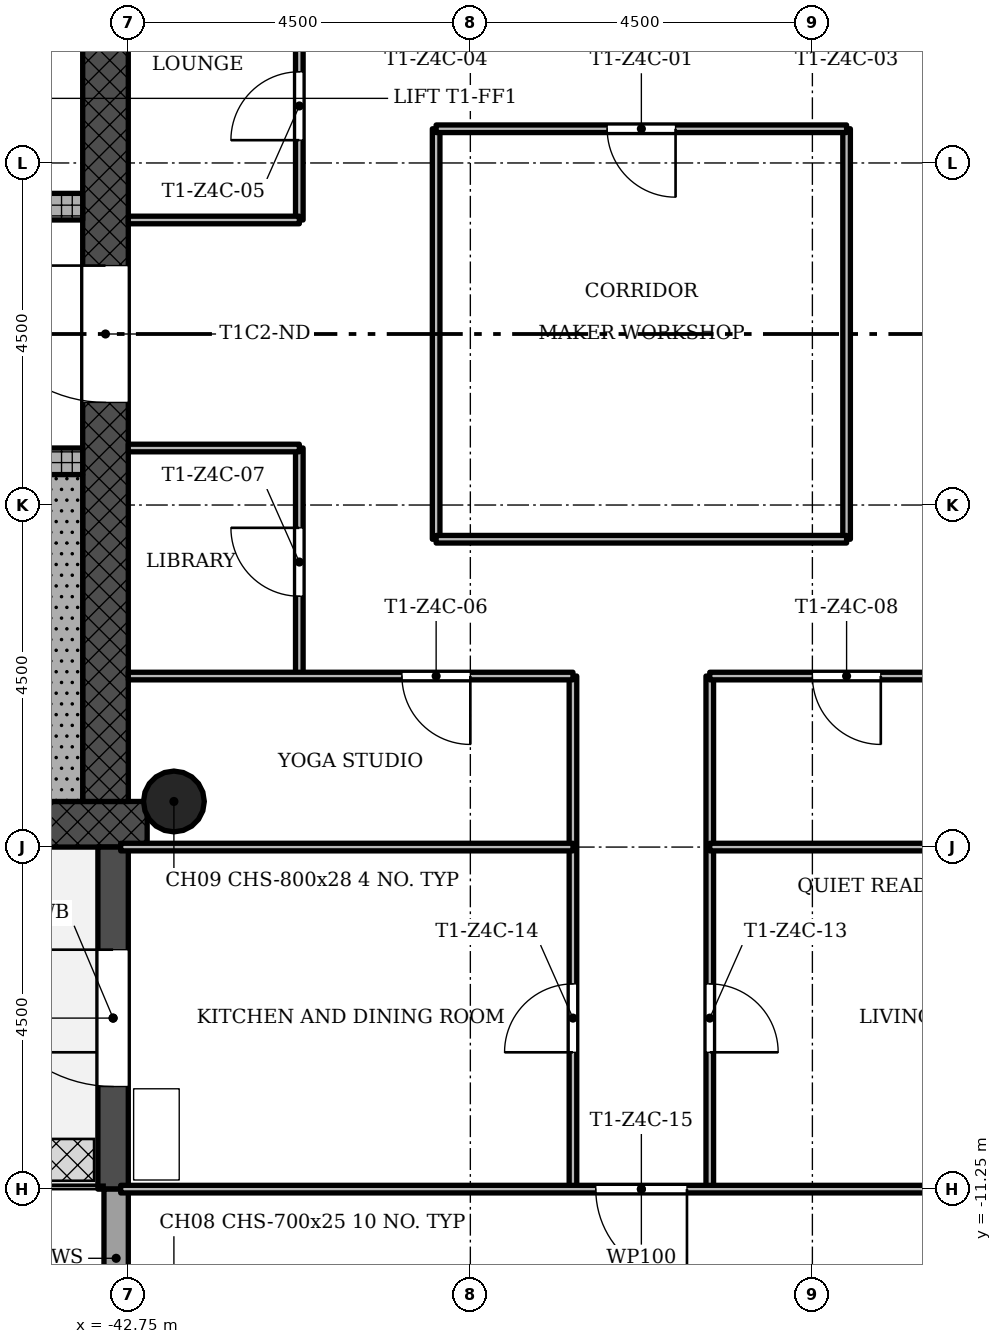
"""IFC4 building model, lengths in metres.
Left out: names, types, materials, properties, quantities, classifications, styles, units other than length and angle.
Written with IfcOpenShell. Run it as: python <this file> out.ifc"""

import sys

from ifc_helpers import new_model, si_unit, direction, frame, frame_2d, origin, origin_2d, place, context, subcontext, project, spatial, rectangle, hollow_circle, extrude, element, fill, save


model = new_model("IFC4")
c1 = context("Model", 3, precision=1e-05, world=origin(), true_north=direction((0.0, 1.0)))
c2 = subcontext(c1, "Body", "Model", "MODEL_VIEW")
j1 = project(units=[si_unit("LENGTHUNIT", "METRE"), si_unit("PLANEANGLEUNIT", "RADIAN")], contexts=[c1])
p1 = place(None, origin())
s1 = spatial("IfcSite", under=j1, at=p1, CompositionType="ELEMENT")
p2 = place(p1, origin())
s2 = spatial("IfcBuilding", under=s1, at=p2, CompositionType="ELEMENT")
p3 = place(p2, frame((0.0, 0.0, 192.6)))
s3 = spatial("IfcBuildingStorey", under=s2, at=p3, CompositionType="ELEMENT", Elevation=192.6)
p4 = place(p3, frame((-51.15, -6.45, 0.0), z_axis=(0.0, 0.0, 1.0), x_axis=(1.0, 0.0, 0.0)))
e1 = element("IfcWall", 1, at=p4, inside=s3, PredefinedType="SHEAR", context=c2, shape_type="SweptSolid", body=[
    extrude(rectangle(XDim=8.648, YDim=0.6, at=frame_2d((4.324, 0.0))), origin(), (0.0, 0.0, 1.0), 3.4),
])
p5 = place(p3, frame((-43.05, -6.15, 0.0), z_axis=(0.0, 0.0, 1.0), x_axis=(0.0, 1.0, 0.0)))
e2 = element("IfcWall", 2, at=p5, inside=s3, PredefinedType="SHEAR", context=c2, shape_type="SweptSolid", body=[
    extrude(rectangle(XDim=12.9, YDim=0.6, at=frame_2d((6.45, 0.0))), origin(), (0.0, 0.0, 1.0), 3.4),
])
p6 = place(p5, frame((5.25, 0.0, 0.0)))
e3 = element("IfcOpeningElement", 3, at=p6, cuts=e2, PredefinedType="OPENING", context=c2, shape_type="SweptSolid", body=[
    extrude(rectangle(XDim=1.8, YDim=2.1, at=frame_2d((0.9, 1.05))), frame((0.0, 0.31, 0.0), z_axis=(0.0, -1.0, 0.0), x_axis=(1.0, 0.0, 0.0)), (0.0, 0.0, 1.0), 0.62),
])
p7 = place(p3, frame((-51.15, -1.675, 0.0), z_axis=(0.0, 0.0, 1.0), x_axis=(1.0, 0.0, 0.0)))
e4 = element("IfcWall", 4, at=p7, inside=s3, PredefinedType="SHEAR", context=c2, shape_type="SweptSolid", body=[
    extrude(rectangle(XDim=7.8, YDim=0.35, at=frame_2d((3.9, 0.0))), origin(), (0.0, 0.0, 1.0), 3.4),
])
p8 = place(p7, frame((5.85, 0.0, 0.0)))
e5 = element("IfcOpeningElement", 5, at=p8, cuts=e4, PredefinedType="OPENING", context=c2, shape_type="SweptSolid", body=[
    extrude(rectangle(XDim=0.9, YDim=2.1, at=frame_2d((0.45, 1.05))), frame((0.0, 0.185, 0.0), z_axis=(0.0, -1.0, 0.0), x_axis=(1.0, 0.0, 0.0)), (0.0, 0.0, 1.0), 0.37),
])
p9 = place(p3, frame((-51.15, 1.675, 0.0), z_axis=(0.0, 0.0, 1.0), x_axis=(1.0, 0.0, 0.0)))
e6 = element("IfcWall", 6, at=p9, inside=s3, PredefinedType="SHEAR", context=c2, shape_type="SweptSolid", body=[
    extrude(rectangle(XDim=7.8, YDim=0.35, at=frame_2d((3.9, 0.0))), origin(), (0.0, 0.0, 1.0), 3.4),
])
p10 = place(p9, frame((5.55, 0.0, 0.0)))
e7 = element("IfcOpeningElement", 7, at=p10, cuts=e6, PredefinedType="OPENING", context=c2, shape_type="SweptSolid", body=[
    extrude(rectangle(XDim=1.1, YDim=2.1, at=frame_2d((0.55, 1.05))), frame((0.0, 0.185, 0.0), z_axis=(0.0, -1.0, 0.0), x_axis=(1.0, 0.0, 0.0)), (0.0, 0.0, 1.0), 0.37),
])
p11 = place(p9, frame((1.2, 0.0, 0.0)))
e8 = element("IfcOpeningElement", 8, at=p11, cuts=e6, PredefinedType="OPENING", context=c2, shape_type="SweptSolid", body=[
    extrude(rectangle(XDim=1.1, YDim=2.1, at=frame_2d((0.55, 1.05))), frame((0.0, 0.185, 0.0), z_axis=(0.0, -1.0, 0.0), x_axis=(1.0, 0.0, 0.0)), (0.0, 0.0, 1.0), 0.37),
])
p12 = place(p9, frame((3.5, 0.0, 0.0)))
e9 = element("IfcOpeningElement", 9, at=p12, cuts=e6, PredefinedType="OPENING", context=c2, shape_type="SweptSolid", body=[
    extrude(rectangle(XDim=0.9, YDim=2.1, at=frame_2d((0.45, 1.05))), frame((0.0, 0.185, 0.0), z_axis=(0.0, -1.0, 0.0), x_axis=(1.0, 0.0, 0.0)), (0.0, 0.0, 1.0), 0.37),
])
p13 = place(p3, frame((-42.15, -6.15, 0.0), z_axis=(0.0, 0.0, 1.0), x_axis=(1.0, 0.0, 0.0)))
e10 = element("IfcColumn", 10, at=p13, inside=s3, PredefinedType="COLUMN", context=c2, shape_type="SweptSolid", body=[
    extrude(hollow_circle(Radius=0.4, WallThickness=0.028, at=origin_2d()), origin(), (0.0, 0.0, 1.0), 3.4),
])
p14 = place(p3, frame((-42.95, -6.75, -0.02), z_axis=(0.0, 0.0, 1.0), x_axis=(0.0, -1.0, 0.0)))
e11 = element("IfcWall", 11, at=p14, inside=s3, PredefinedType="STANDARD", context=c2, shape_type="SweptSolid", body=[
    extrude(rectangle(XDim=4.5, YDim=0.4, at=frame_2d((2.25, 0.0))), origin(), (0.0, 0.0, 1.0), 3.12),
])
p15 = place(p14, frame((1.35, 0.0, 0.02)))
e12 = element("IfcOpeningElement", 12, at=p15, cuts=e11, PredefinedType="OPENING", context=c2, shape_type="SweptSolid", body=[
    extrude(rectangle(XDim=1.8, YDim=2.1, at=frame_2d((0.9, 1.05))), frame((0.0, 0.21, 0.0), z_axis=(0.0, -1.0, 0.0), x_axis=(1.0, 0.0, 0.0)), (0.0, 0.0, 1.0), 0.42),
])
p16 = place(p3, frame((-42.91, -11.25, -0.3), z_axis=(0.0, 0.0, 1.0), x_axis=(0.0, -1.0, 0.0)))
e13 = element("IfcWall", 13, at=p16, inside=s3, PredefinedType="STANDARD", context=c2, shape_type="SweptSolid", body=[
    extrude(rectangle(XDim=1.82, YDim=0.32, at=frame_2d((0.91, 0.0))), origin(), (0.0, 0.0, 1.0), 3.4),
])
p17 = place(p3, frame((-40.5, -4.5, 0.0), z_axis=(0.0, 0.0, 1.0), x_axis=(0.0, 1.0, 0.0)))
e14 = element("IfcWall", 14, at=p17, inside=s3, PredefinedType="PARTITIONING", context=c2, shape_type="SweptSolid", body=[
    extrude(rectangle(XDim=3.0, YDim=0.1, at=frame_2d((1.5, 0.0))), origin(), (0.0, 0.0, 1.0), 3.0),
])
p18 = place(p17, frame((1.05, 0.0, 0.0)))
e15 = element("IfcOpeningElement", 15, at=p18, cuts=e14, PredefinedType="OPENING", context=c2, shape_type="SweptSolid", body=[
    extrude(rectangle(XDim=0.9, YDim=2.1, at=frame_2d((0.45, 1.05))), frame((0.0, 0.06, 0.0), z_axis=(0.0, -1.0, 0.0), x_axis=(1.0, 0.0, 0.0)), (0.0, 0.0, 1.0), 0.12),
])
p19 = place(p3, frame((-40.5, 1.5, 0.0), z_axis=(0.0, 0.0, 1.0), x_axis=(0.0, 1.0, 0.0)))
e16 = element("IfcWall", 16, at=p19, inside=s3, PredefinedType="PARTITIONING", context=c2, shape_type="SweptSolid", body=[
    extrude(rectangle(XDim=5.25, YDim=0.1, at=frame_2d((2.625, 0.0))), origin(), (0.0, 0.0, 1.0), 3.0),
])
p20 = place(p19, frame((1.05, 0.0, 0.0)))
e17 = element("IfcOpeningElement", 17, at=p20, cuts=e16, PredefinedType="OPENING", context=c2, shape_type="SweptSolid", body=[
    extrude(rectangle(XDim=0.9, YDim=2.1, at=frame_2d((0.45, 1.05))), frame((0.0, 0.06, 0.0), z_axis=(0.0, -1.0, 0.0), x_axis=(1.0, 0.0, 0.0)), (0.0, 0.0, 1.0), 0.12),
])
p21 = place(p3, frame((-38.7, -2.7, 0.0), z_axis=(0.0, 0.0, 1.0), x_axis=(0.0, 1.0, 0.0)))
e18 = element("IfcWall", 18, at=p21, inside=s3, PredefinedType="PARTITIONING", context=c2, shape_type="SweptSolid", body=[
    extrude(rectangle(XDim=5.4, YDim=0.1, at=frame_2d((2.7, 0.0))), origin(), (0.0, 0.0, 1.0), 3.0),
])
p22 = place(p3, frame((-36.9, -11.25, 0.0), z_axis=(0.0, 0.0, 1.0), x_axis=(0.0, 1.0, 0.0)))
e19 = element("IfcWall", 19, at=p22, inside=s3, PredefinedType="PARTITIONING", context=c2, shape_type="SweptSolid", body=[
    extrude(rectangle(XDim=6.75, YDim=0.1, at=frame_2d((3.375, 0.0))), origin(), (0.0, 0.0, 1.0), 3.0),
])
p23 = place(p22, frame((1.8, 0.0, 0.0)))
e20 = element("IfcOpeningElement", 20, at=p23, cuts=e19, PredefinedType="OPENING", context=c2, shape_type="SweptSolid", body=[
    extrude(rectangle(XDim=0.9, YDim=2.1, at=frame_2d((0.45, 1.05))), frame((0.0, 0.06, 0.0), z_axis=(0.0, -1.0, 0.0), x_axis=(1.0, 0.0, 0.0)), (0.0, 0.0, 1.0), 0.12),
])
p24 = place(p3, frame((-35.1, -11.25, 0.0), z_axis=(0.0, 0.0, 1.0), x_axis=(0.0, 1.0, 0.0)))
e21 = element("IfcWall", 21, at=p24, inside=s3, PredefinedType="PARTITIONING", context=c2, shape_type="SweptSolid", body=[
    extrude(rectangle(XDim=6.75, YDim=0.1, at=frame_2d((3.375, 0.0))), origin(), (0.0, 0.0, 1.0), 3.0),
])
p25 = place(p24, frame((1.8, 0.0, 0.0)))
e22 = element("IfcOpeningElement", 22, at=p25, cuts=e21, PredefinedType="OPENING", context=c2, shape_type="SweptSolid", body=[
    extrude(rectangle(XDim=0.9, YDim=2.1, at=frame_2d((0.45, 1.05))), frame((0.0, 0.06, 0.0), z_axis=(0.0, -1.0, 0.0), x_axis=(1.0, 0.0, 0.0)), (0.0, 0.0, 1.0), 0.12),
])
p26 = place(p3, frame((-33.3, -2.7, 0.0), z_axis=(0.0, 0.0, 1.0), x_axis=(0.0, 1.0, 0.0)))
e23 = element("IfcWall", 23, at=p26, inside=s3, PredefinedType="PARTITIONING", context=c2, shape_type="SweptSolid", body=[
    extrude(rectangle(XDim=5.4, YDim=0.1, at=frame_2d((2.7, 0.0))), origin(), (0.0, 0.0, 1.0), 3.0),
])
p27 = place(p3, frame((-42.85, -11.25, 0.0), z_axis=(0.0, 0.0, 1.0), x_axis=(1.0, 0.0, 0.0)))
e24 = element("IfcWall", 24, at=p27, inside=s3, PredefinedType="PARTITIONING", context=c2, shape_type="SweptSolid", body=[
    extrude(rectangle(XDim=13.7, YDim=0.1, at=frame_2d((6.85, 0.0))), origin(), (0.0, 0.0, 1.0), 3.0),
])
p28 = place(p27, frame((6.25, 0.0, 0.0)))
e25 = element("IfcOpeningElement", 25, at=p28, cuts=e24, PredefinedType="OPENING", context=c2, shape_type="SweptSolid", body=[
    extrude(rectangle(XDim=1.2, YDim=2.1, at=frame_2d((0.6, 1.05))), frame((0.0, 0.06, 0.0), z_axis=(0.0, -1.0, 0.0), x_axis=(1.0, 0.0, 0.0)), (0.0, 0.0, 1.0), 0.12),
])
for number, where, z_axis, x_axis in (
    (26, (-42.85, -6.75, 0.0), (0.0, 0.0, 1.0), (1.0, 0.0, 0.0)),
    (27, (-35.1, -6.75, 0.0), (0.0, 0.0, 1.0), (1.0, 0.0, 0.0)),
):
    element("IfcWall", number, at=place(p3, frame(where, z_axis=z_axis, x_axis=x_axis)), inside=s3, PredefinedType="PARTITIONING", context=c2, shape_type="SweptSolid", body=[
        extrude(rectangle(XDim=5.95, YDim=0.1, at=frame_2d((2.975, 0.0))), origin(), (0.0, 0.0, 1.0), 3.0),
    ])
p29 = place(p3, frame((-42.75, -4.5, 0.0), z_axis=(0.0, 0.0, 1.0), x_axis=(1.0, 0.0, 0.0)))
e28 = element("IfcWall", 28, at=p29, inside=s3, PredefinedType="PARTITIONING", context=c2, shape_type="SweptSolid", body=[
    extrude(rectangle(XDim=5.85, YDim=0.1, at=frame_2d((2.925, 0.0))), origin(), (0.0, 0.0, 1.0), 3.0),
])
p30 = place(p29, frame((3.6, 0.0, 0.0)))
e29 = element("IfcOpeningElement", 29, at=p30, cuts=e28, PredefinedType="OPENING", context=c2, shape_type="SweptSolid", body=[
    extrude(rectangle(XDim=0.9, YDim=2.1, at=frame_2d((0.45, 1.05))), frame((0.0, 0.06, 0.0), z_axis=(0.0, -1.0, 0.0), x_axis=(1.0, 0.0, 0.0)), (0.0, 0.0, 1.0), 0.12),
])
p31 = place(p3, frame((-35.1, -4.5, 0.0), z_axis=(0.0, 0.0, 1.0), x_axis=(1.0, 0.0, 0.0)))
e30 = element("IfcWall", 30, at=p31, inside=s3, PredefinedType="PARTITIONING", context=c2, shape_type="SweptSolid", body=[
    extrude(rectangle(XDim=3.6, YDim=0.1, at=frame_2d((1.8, 0.0))), origin(), (0.0, 0.0, 1.0), 3.0),
])
p32 = place(p31, frame((1.35, 0.0, 0.0)))
e31 = element("IfcOpeningElement", 31, at=p32, cuts=e30, PredefinedType="OPENING", context=c2, shape_type="SweptSolid", body=[
    extrude(rectangle(XDim=0.9, YDim=2.1, at=frame_2d((0.45, 1.05))), frame((0.0, 0.06, 0.0), z_axis=(0.0, -1.0, 0.0), x_axis=(1.0, 0.0, 0.0)), (0.0, 0.0, 1.0), 0.12),
])
p33 = place(p3, frame((-38.7, -2.7, 0.0), z_axis=(0.0, 0.0, 1.0), x_axis=(1.0, 0.0, 0.0)))
e32 = element("IfcWall", 32, at=p33, inside=s3, PredefinedType="PARTITIONING", context=c2, shape_type="SweptSolid", body=[
    extrude(rectangle(XDim=5.4, YDim=0.1, at=frame_2d((2.7, 0.0))), origin(), (0.0, 0.0, 1.0), 3.0),
])
for number, where, z_axis, x_axis in (
    (33, (-42.75, -1.5, 0.0), (0.0, 0.0, 1.0), (1.0, 0.0, 0.0)),
    (34, (-42.75, 1.5, 0.0), (0.0, 0.0, 1.0), (1.0, 0.0, 0.0)),
):
    element("IfcWall", number, at=place(p3, frame(where, z_axis=z_axis, x_axis=x_axis)), inside=s3, PredefinedType="PARTITIONING", context=c2, shape_type="SweptSolid", body=[
        extrude(rectangle(XDim=2.25, YDim=0.1, at=frame_2d((1.125, 0.0))), origin(), (0.0, 0.0, 1.0), 3.0),
    ])
p34 = place(p3, frame((-38.7, 2.7, 0.0), z_axis=(0.0, 0.0, 1.0), x_axis=(1.0, 0.0, 0.0)))
e35 = element("IfcWall", 35, at=p34, inside=s3, PredefinedType="PARTITIONING", context=c2, shape_type="SweptSolid", body=[
    extrude(rectangle(XDim=5.4, YDim=0.1, at=frame_2d((2.7, 0.0))), origin(), (0.0, 0.0, 1.0), 3.0),
])
p35 = place(p34, frame((2.25, 0.0, 0.0)))
e36 = element("IfcOpeningElement", 36, at=p35, cuts=e35, PredefinedType="OPENING", context=c2, shape_type="SweptSolid", body=[
    extrude(rectangle(XDim=0.9, YDim=2.1, at=frame_2d((0.45, 1.05))), frame((0.0, 0.06, 0.0), z_axis=(0.0, -1.0, 0.0), x_axis=(1.0, 0.0, 0.0)), (0.0, 0.0, 1.0), 0.12),
])
p36 = place(p3, frame((-43.65, -1.85, 0.0), z_axis=(0.0, 0.0, 1.0), x_axis=(0.0, -1.0, 0.0)))
e37 = element("IfcWall", 37, at=p36, inside=s3, PredefinedType="SHEAR", context=c2, shape_type="SweptSolid", body=[
    extrude(rectangle(XDim=4.3, YDim=0.6, at=frame_2d((2.15, 0.0))), origin(), (0.0, 0.0, 1.0), 3.4),
])
p37 = place(p15, origin())
e38 = element("IfcDoor", 38, at=p37, inside=s3, OperationType="SINGLE_SWING_LEFT", PredefinedType="DOOR", context=c2, shape_type="SweptSolid", body=[
    extrude(rectangle(XDim=1.8, YDim=2.1, at=frame_2d((0.9, 1.05))), frame((0.0, 0.025, 0.0), z_axis=(0.0, -1.0, 0.0), x_axis=(1.0, 0.0, 0.0)), (0.0, 0.0, 1.0), 0.05),
])
fill(e12, e38)
p38 = place(p35, origin())
e39 = element("IfcDoor", 39, at=p38, inside=s3, OperationType="SINGLE_SWING_RIGHT", PredefinedType="DOOR", context=c2, shape_type="SweptSolid", body=[
    extrude(rectangle(XDim=0.9, YDim=2.1, at=frame_2d((0.45, 1.05))), frame((0.0, 0.025, 0.0), z_axis=(0.0, -1.0, 0.0), x_axis=(1.0, 0.0, 0.0)), (0.0, 0.0, 1.0), 0.05),
])
fill(e36, e39)
p39 = place(p20, origin())
e40 = element("IfcDoor", 40, at=p39, inside=s3, OperationType="SINGLE_SWING_RIGHT", PredefinedType="DOOR", context=c2, shape_type="SweptSolid", body=[
    extrude(rectangle(XDim=0.9, YDim=2.1, at=frame_2d((0.45, 1.05))), frame((0.0, 0.025, 0.0), z_axis=(0.0, -1.0, 0.0), x_axis=(1.0, 0.0, 0.0)), (0.0, 0.0, 1.0), 0.05),
])
fill(e17, e40)
p40 = place(p30, origin())
e41 = element("IfcDoor", 41, at=p40, inside=s3, OperationType="SINGLE_SWING_RIGHT", PredefinedType="DOOR", context=c2, shape_type="SweptSolid", body=[
    extrude(rectangle(XDim=0.9, YDim=2.1, at=frame_2d((0.45, 1.05))), frame((0.0, 0.025, 0.0), z_axis=(0.0, -1.0, 0.0), x_axis=(1.0, 0.0, 0.0)), (0.0, 0.0, 1.0), 0.05),
])
fill(e29, e41)
p41 = place(p18, origin())
e42 = element("IfcDoor", 42, at=p41, inside=s3, OperationType="SINGLE_SWING_LEFT", PredefinedType="DOOR", context=c2, shape_type="SweptSolid", body=[
    extrude(rectangle(XDim=0.9, YDim=2.1, at=frame_2d((0.45, 1.05))), frame((0.0, 0.025, 0.0), z_axis=(0.0, -1.0, 0.0), x_axis=(1.0, 0.0, 0.0)), (0.0, 0.0, 1.0), 0.05),
])
fill(e15, e42)
p42 = place(p32, origin())
e43 = element("IfcDoor", 43, at=p42, inside=s3, OperationType="SINGLE_SWING_RIGHT", PredefinedType="DOOR", context=c2, shape_type="SweptSolid", body=[
    extrude(rectangle(XDim=0.9, YDim=2.1, at=frame_2d((0.45, 1.05))), frame((0.0, 0.025, 0.0), z_axis=(0.0, -1.0, 0.0), x_axis=(1.0, 0.0, 0.0)), (0.0, 0.0, 1.0), 0.05),
])
fill(e31, e43)
p43 = place(p25, origin())
e44 = element("IfcDoor", 44, at=p43, inside=s3, OperationType="SINGLE_SWING_LEFT", PredefinedType="DOOR", context=c2, shape_type="SweptSolid", body=[
    extrude(rectangle(XDim=0.9, YDim=2.1, at=frame_2d((0.45, 1.05))), frame((0.0, 0.025, 0.0), z_axis=(0.0, -1.0, 0.0), x_axis=(1.0, 0.0, 0.0)), (0.0, 0.0, 1.0), 0.05),
])
fill(e22, e44)
p44 = place(p23, origin())
e45 = element("IfcDoor", 45, at=p44, inside=s3, OperationType="SINGLE_SWING_RIGHT", PredefinedType="DOOR", context=c2, shape_type="SweptSolid", body=[
    extrude(rectangle(XDim=0.9, YDim=2.1, at=frame_2d((0.45, 1.05))), frame((0.0, 0.025, 0.0), z_axis=(0.0, -1.0, 0.0), x_axis=(1.0, 0.0, 0.0)), (0.0, 0.0, 1.0), 0.05),
])
fill(e20, e45)
p45 = place(p28, origin())
e46 = element("IfcDoor", 46, at=p45, inside=s3, OperationType="SINGLE_SWING_RIGHT", PredefinedType="DOOR", context=c2, shape_type="SweptSolid", body=[
    extrude(rectangle(XDim=1.2, YDim=2.1, at=frame_2d((0.6, 1.05))), frame((0.0, 0.025, 0.0), z_axis=(0.0, -1.0, 0.0), x_axis=(1.0, 0.0, 0.0)), (0.0, 0.0, 1.0), 0.05),
])
fill(e25, e46)
p46 = place(p6, origin())
e47 = element("IfcDoor", 47, at=p46, inside=s3, OperationType="SINGLE_SWING_LEFT", PredefinedType="DOOR", context=c2, shape_type="SweptSolid", body=[
    extrude(rectangle(XDim=1.8, YDim=2.1, at=frame_2d((0.9, 1.05))), frame((0.0, 0.025, 0.0), z_axis=(0.0, -1.0, 0.0), x_axis=(1.0, 0.0, 0.0)), (0.0, 0.0, 1.0), 0.05),
])
fill(e3, e47)
save(model, sys.argv[1])
